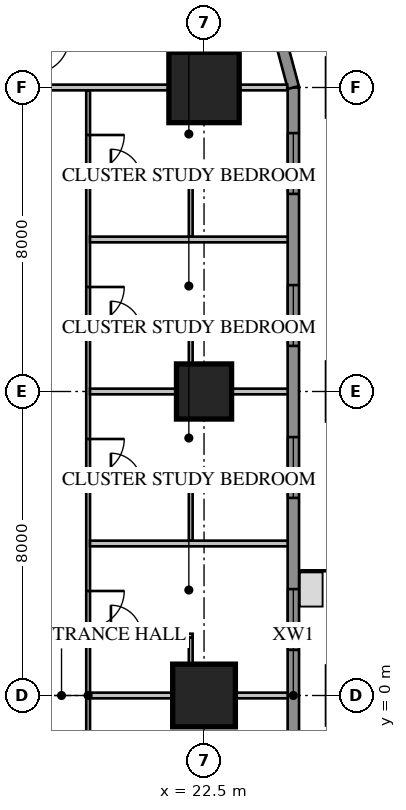
"""IFC4 building model, lengths in metres.
Left out: names, types, materials, properties, quantities, classifications, styles, units other than length and angle.
Written with IfcOpenShell. Run it as: python <this file> out.ifc"""

import sys

from ifc_helpers import new_model, si_unit, direction, frame, frame_2d, origin, origin_2d, place, context, subcontext, project, spatial, rectangle, extrude, element, fill, save


model = new_model("IFC4")
c1 = context("Model", 3, precision=1e-05, world=origin(), true_north=direction((0.0, 1.0)))
c2 = subcontext(c1, "Body", "Model", "MODEL_VIEW")
j1 = project(units=[si_unit("LENGTHUNIT", "METRE"), si_unit("PLANEANGLEUNIT", "RADIAN")], contexts=[c1])
p1 = place(None, origin())
s1 = spatial("IfcSite", under=j1, at=p1, CompositionType="ELEMENT")
p2 = place(p1, origin())
s2 = spatial("IfcBuilding", under=s1, at=p2, CompositionType="ELEMENT")
p3 = place(p2, frame((0.0, 0.0, 27.55)))
s3 = spatial("IfcBuildingStorey", under=s2, at=p3, CompositionType="ELEMENT", Elevation=27.55)
p4 = place(p3, frame((22.5, 0.0, 0.0), z_axis=(0.0, 0.0, 1.0), x_axis=(1.0, 0.0, 0.0)))
e1 = element("IfcColumn", 1, at=p4, inside=s3, PredefinedType="COLUMN", context=c2, shape_type="SweptSolid", body=[
    extrude(rectangle(XDim=1.65, YDim=1.65, at=origin_2d()), origin(), (0.0, 0.0, 1.0), 3.85),
])
p5 = place(p3, frame((22.5, 8.0, 0.0), z_axis=(0.0, 0.0, 1.0), x_axis=(1.0, 0.0, 0.0)))
e2 = element("IfcColumn", 2, at=p5, inside=s3, PredefinedType="COLUMN", context=c2, shape_type="SweptSolid", body=[
    extrude(rectangle(XDim=1.45, YDim=1.45, at=origin_2d()), origin(), (0.0, 0.0, 1.0), 3.85),
])
p6 = place(p3, frame((22.5, 16.0, 0.0), z_axis=(0.0, 0.0, 1.0), x_axis=(1.0, 0.0, 0.0)))
e3 = element("IfcColumn", 3, at=p6, inside=s3, PredefinedType="COLUMN", context=c2, shape_type="SweptSolid", body=[
    extrude(rectangle(XDim=1.85, YDim=1.85, at=origin_2d()), origin(), (0.0, 0.0, 1.0), 3.85),
])
p7 = place(p3, frame((24.85, -16.0, 0.0), z_axis=(0.0, 0.0, 1.0), x_axis=(0.0, 1.0, 0.0)))
e4 = element("IfcWall", 4, at=p7, inside=s3, PredefinedType="SOLIDWALL", context=c2, shape_type="SweptSolid", body=[
    extrude(rectangle(XDim=32.0, YDim=0.3, at=frame_2d((16.0, 0.0))), origin(), (0.0, 0.0, 1.0), 3.65),
])
p8 = place(p7, frame((1.2, 0.0, 0.75)))
e5 = element("IfcOpeningElement", 5, at=p8, cuts=e4, PredefinedType="OPENING", context=c2, shape_type="SweptSolid", body=[
    extrude(rectangle(XDim=1.6, YDim=1.8, at=frame_2d((0.8, 0.9))), frame((0.0, 0.17, 0.0), z_axis=(0.0, -1.0, 0.0), x_axis=(1.0, 0.0, 0.0)), (0.0, 0.0, 1.0), 0.34),
])
p9 = place(p7, frame((5.2, 0.0, 0.75)))
e6 = element("IfcOpeningElement", 6, at=p9, cuts=e4, PredefinedType="OPENING", context=c2, shape_type="SweptSolid", body=[
    extrude(rectangle(XDim=1.6, YDim=1.8, at=frame_2d((0.8, 0.9))), frame((0.0, 0.17, 0.0), z_axis=(0.0, -1.0, 0.0), x_axis=(1.0, 0.0, 0.0)), (0.0, 0.0, 1.0), 0.34),
])
p10 = place(p7, frame((17.2, 0.0, 0.75)))
e7 = element("IfcOpeningElement", 7, at=p10, cuts=e4, PredefinedType="OPENING", context=c2, shape_type="SweptSolid", body=[
    extrude(rectangle(XDim=1.6, YDim=1.8, at=frame_2d((0.8, 0.9))), frame((0.0, 0.17, 0.0), z_axis=(0.0, -1.0, 0.0), x_axis=(1.0, 0.0, 0.0)), (0.0, 0.0, 1.0), 0.34),
])
p11 = place(p7, frame((21.2, 0.0, 0.75)))
e8 = element("IfcOpeningElement", 8, at=p11, cuts=e4, PredefinedType="OPENING", context=c2, shape_type="SweptSolid", body=[
    extrude(rectangle(XDim=1.6, YDim=1.8, at=frame_2d((0.8, 0.9))), frame((0.0, 0.17, 0.0), z_axis=(0.0, -1.0, 0.0), x_axis=(1.0, 0.0, 0.0)), (0.0, 0.0, 1.0), 0.34),
])
p12 = place(p7, frame((25.2, 0.0, 0.75)))
e9 = element("IfcOpeningElement", 9, at=p12, cuts=e4, PredefinedType="OPENING", context=c2, shape_type="SweptSolid", body=[
    extrude(rectangle(XDim=1.6, YDim=1.8, at=frame_2d((0.8, 0.9))), frame((0.0, 0.17, 0.0), z_axis=(0.0, -1.0, 0.0), x_axis=(1.0, 0.0, 0.0)), (0.0, 0.0, 1.0), 0.34),
])
p13 = place(p7, frame((29.2, 0.0, 0.75)))
e10 = element("IfcOpeningElement", 10, at=p13, cuts=e4, PredefinedType="OPENING", context=c2, shape_type="SweptSolid", body=[
    extrude(rectangle(XDim=1.6, YDim=1.8, at=frame_2d((0.8, 0.9))), frame((0.0, 0.17, 0.0), z_axis=(0.0, -1.0, 0.0), x_axis=(1.0, 0.0, 0.0)), (0.0, 0.0, 1.0), 0.34),
])
p14 = place(p7, frame((8.8, 0.0, 0.75)))
e11 = element("IfcOpeningElement", 11, at=p14, cuts=e4, PredefinedType="OPENING", context=c2, shape_type="SweptSolid", body=[
    extrude(rectangle(XDim=2.4, YDim=1.8, at=frame_2d((1.2, 0.9))), frame((0.0, 0.17, 0.0), z_axis=(0.0, -1.0, 0.0), x_axis=(1.0, 0.0, 0.0)), (0.0, 0.0, 1.0), 0.34),
])
p15 = place(p7, frame((13.812, 0.0, 0.0)))
e12 = element("IfcOpeningElement", 12, at=p15, cuts=e4, PredefinedType="OPENING", context=c2, shape_type="SweptSolid", body=[
    extrude(rectangle(XDim=1.0, YDim=2.4, at=frame_2d((0.5, 1.2))), frame((0.0, 0.17, 0.0), z_axis=(0.0, -1.0, 0.0), x_axis=(1.0, 0.0, 0.0)), (0.0, 0.0, 1.0), 0.34),
])
p16 = place(p3, frame((24.85, 16.0, 0.0), z_axis=(0.0, 0.0, 1.0), x_axis=(-0.258839972501, 0.965920218567, 0.0)))
e13 = element("IfcWall", 13, at=p16, inside=s3, PredefinedType="SOLIDWALL", context=c2, shape_type="SweptSolid", body=[
    extrude(rectangle(XDim=4.581, YDim=0.3, at=frame_2d((2.291, 0.0))), origin(), (0.0, 0.0, 1.0), 3.65),
])
p17 = place(p3, frame((19.45, -15.925, 0.0), z_axis=(0.0, 0.0, 1.0), x_axis=(0.0, 1.0, 0.0)))
e14 = element("IfcWall", 14, at=p17, inside=s3, PredefinedType="PARTITIONING", context=c2, shape_type="SweptSolid", body=[
    extrude(rectangle(XDim=31.85, YDim=0.1, at=frame_2d((15.925, 0.0))), origin(), (0.0, 0.0, 1.0), 3.65),
])
p18 = place(p17, frame((10.125, 0.0, 0.0)))
e15 = element("IfcOpeningElement", 15, at=p18, cuts=e14, PredefinedType="OPENING", context=c2, shape_type="SweptSolid", body=[
    extrude(rectangle(XDim=1.0, YDim=2.1, at=frame_2d((0.5, 1.05))), frame((0.0, 0.07, 0.0), z_axis=(0.0, -1.0, 0.0), x_axis=(1.0, 0.0, 0.0)), (0.0, 0.0, 1.0), 0.14),
])
p19 = place(p17, frame((8.3, 0.0, 0.0)))
e16 = element("IfcOpeningElement", 16, at=p19, cuts=e14, PredefinedType="OPENING", context=c2, shape_type="SweptSolid", body=[
    extrude(rectangle(XDim=0.8, YDim=2.1, at=frame_2d((0.4, 1.05))), frame((0.0, 0.07, 0.0), z_axis=(0.0, -1.0, 0.0), x_axis=(1.0, 0.0, 0.0)), (0.0, 0.0, 1.0), 0.14),
])
p20 = place(p17, frame((1.725, 0.0, 0.0)))
e17 = element("IfcOpeningElement", 17, at=p20, cuts=e14, PredefinedType="OPENING", context=c2, shape_type="SweptSolid", body=[
    extrude(rectangle(XDim=0.95, YDim=2.1, at=frame_2d((0.475, 1.05))), frame((0.0, 0.07, 0.0), z_axis=(0.0, -1.0, 0.0), x_axis=(1.0, 0.0, 0.0)), (0.0, 0.0, 1.0), 0.14),
])
p21 = place(p17, frame((5.725, 0.0, 0.0)))
e18 = element("IfcOpeningElement", 18, at=p21, cuts=e14, PredefinedType="OPENING", context=c2, shape_type="SweptSolid", body=[
    extrude(rectangle(XDim=0.95, YDim=2.1, at=frame_2d((0.475, 1.05))), frame((0.0, 0.07, 0.0), z_axis=(0.0, -1.0, 0.0), x_axis=(1.0, 0.0, 0.0)), (0.0, 0.0, 1.0), 0.14),
])
p22 = place(p17, frame((17.725, 0.0, 0.0)))
e19 = element("IfcOpeningElement", 19, at=p22, cuts=e14, PredefinedType="OPENING", context=c2, shape_type="SweptSolid", body=[
    extrude(rectangle(XDim=0.95, YDim=2.1, at=frame_2d((0.475, 1.05))), frame((0.0, 0.07, 0.0), z_axis=(0.0, -1.0, 0.0), x_axis=(1.0, 0.0, 0.0)), (0.0, 0.0, 1.0), 0.14),
])
p23 = place(p17, frame((21.725, 0.0, 0.0)))
e20 = element("IfcOpeningElement", 20, at=p23, cuts=e14, PredefinedType="OPENING", context=c2, shape_type="SweptSolid", body=[
    extrude(rectangle(XDim=0.95, YDim=2.1, at=frame_2d((0.475, 1.05))), frame((0.0, 0.07, 0.0), z_axis=(0.0, -1.0, 0.0), x_axis=(1.0, 0.0, 0.0)), (0.0, 0.0, 1.0), 0.14),
])
p24 = place(p17, frame((25.725, 0.0, 0.0)))
e21 = element("IfcOpeningElement", 21, at=p24, cuts=e14, PredefinedType="OPENING", context=c2, shape_type="SweptSolid", body=[
    extrude(rectangle(XDim=0.95, YDim=2.1, at=frame_2d((0.475, 1.05))), frame((0.0, 0.07, 0.0), z_axis=(0.0, -1.0, 0.0), x_axis=(1.0, 0.0, 0.0)), (0.0, 0.0, 1.0), 0.14),
])
p25 = place(p17, frame((29.725, 0.0, 0.0)))
e22 = element("IfcOpeningElement", 22, at=p25, cuts=e14, PredefinedType="OPENING", context=c2, shape_type="SweptSolid", body=[
    extrude(rectangle(XDim=0.95, YDim=2.1, at=frame_2d((0.475, 1.05))), frame((0.0, 0.07, 0.0), z_axis=(0.0, -1.0, 0.0), x_axis=(1.0, 0.0, 0.0)), (0.0, 0.0, 1.0), 0.14),
])
p26 = place(p3, frame((19.5, 0.0, 0.0), z_axis=(0.0, 0.0, 1.0), x_axis=(1.0, 0.0, 0.0)))
e23 = element("IfcWall", 23, at=p26, inside=s3, PredefinedType="PARTITIONING", context=c2, shape_type="SweptSolid", body=[
    extrude(rectangle(XDim=5.2, YDim=0.15, at=frame_2d((2.6, 0.0))), origin(), (0.0, 0.0, 1.0), 2.957),
])
for number, where, z_axis, x_axis in (
    (24, (19.5, 4.0, 0.0), (0.0, 0.0, 1.0), (1.0, 0.0, 0.0)),
    (25, (19.5, 8.0, 0.0), (0.0, 0.0, 1.0), (1.0, 0.0, 0.0)),
    (26, (19.5, 12.0, 0.0), (0.0, 0.0, 1.0), (1.0, 0.0, 0.0)),
):
    element("IfcWall", number, at=place(p3, frame(where, z_axis=z_axis, x_axis=x_axis)), inside=s3, PredefinedType="PARTITIONING", context=c2, shape_type="SweptSolid", body=[
        extrude(rectangle(XDim=5.2, YDim=0.15, at=frame_2d((2.6, 0.0))), origin(), (0.0, 0.0, 1.0), 3.65),
    ])
p27 = place(p3, frame((18.1, 16.0, 0.0), z_axis=(0.0, 0.0, 1.0), x_axis=(1.0, 0.0, 0.0)))
e27 = element("IfcWall", 27, at=p27, inside=s3, PredefinedType="PARTITIONING", context=c2, shape_type="SweptSolid", body=[
    extrude(rectangle(XDim=6.589, YDim=0.15, at=frame_2d((3.295, 0.0))), origin(), (0.0, 0.0, 1.0), 3.65),
])
p28 = place(p3, frame((19.5, 1.575, 0.0), z_axis=(0.0, 0.0, 1.0), x_axis=(1.0, 0.0, 0.0)))
e28 = element("IfcWall", 28, at=p28, inside=s3, PredefinedType="PARTITIONING", context=c2, shape_type="SweptSolid", body=[
    extrude(rectangle(XDim=2.7, YDim=0.1, at=frame_2d((1.35, 0.0))), origin(), (0.0, 0.0, 1.0), 3.65),
])
p29 = place(p28, frame((0.55, 0.0, 0.0)))
e29 = element("IfcOpeningElement", 29, at=p29, cuts=e28, PredefinedType="OPENING", context=c2, shape_type="SweptSolid", body=[
    extrude(rectangle(XDim=0.8, YDim=2.1, at=frame_2d((0.4, 1.05))), frame((0.0, 0.07, 0.0), z_axis=(0.0, -1.0, 0.0), x_axis=(1.0, 0.0, 0.0)), (0.0, 0.0, 1.0), 0.14),
])
p30 = place(p3, frame((22.15, 0.075, 0.0), z_axis=(0.0, 0.0, 1.0), x_axis=(0.0, 1.0, 0.0)))
e30 = element("IfcWall", 30, at=p30, inside=s3, PredefinedType="PARTITIONING", context=c2, shape_type="SweptSolid", body=[
    extrude(rectangle(XDim=1.45, YDim=0.1, at=frame_2d((0.725, 0.0))), origin(), (0.0, 0.0, 1.0), 3.65),
])
p31 = place(p3, frame((19.5, 5.575, 0.0), z_axis=(0.0, 0.0, 1.0), x_axis=(1.0, 0.0, 0.0)))
e31 = element("IfcWall", 31, at=p31, inside=s3, PredefinedType="PARTITIONING", context=c2, shape_type="SweptSolid", body=[
    extrude(rectangle(XDim=2.7, YDim=0.1, at=frame_2d((1.35, 0.0))), origin(), (0.0, 0.0, 1.0), 3.65),
])
p32 = place(p31, frame((0.55, 0.0, 0.0)))
e32 = element("IfcOpeningElement", 32, at=p32, cuts=e31, PredefinedType="OPENING", context=c2, shape_type="SweptSolid", body=[
    extrude(rectangle(XDim=0.8, YDim=2.1, at=frame_2d((0.4, 1.05))), frame((0.0, 0.07, 0.0), z_axis=(0.0, -1.0, 0.0), x_axis=(1.0, 0.0, 0.0)), (0.0, 0.0, 1.0), 0.14),
])
p33 = place(p3, frame((22.15, 4.075, 0.0), z_axis=(0.0, 0.0, 1.0), x_axis=(0.0, 1.0, 0.0)))
e33 = element("IfcWall", 33, at=p33, inside=s3, PredefinedType="PARTITIONING", context=c2, shape_type="SweptSolid", body=[
    extrude(rectangle(XDim=1.45, YDim=0.1, at=frame_2d((0.725, 0.0))), origin(), (0.0, 0.0, 1.0), 3.65),
])
p34 = place(p3, frame((19.5, 9.575, 0.0), z_axis=(0.0, 0.0, 1.0), x_axis=(1.0, 0.0, 0.0)))
e34 = element("IfcWall", 34, at=p34, inside=s3, PredefinedType="PARTITIONING", context=c2, shape_type="SweptSolid", body=[
    extrude(rectangle(XDim=2.7, YDim=0.1, at=frame_2d((1.35, 0.0))), origin(), (0.0, 0.0, 1.0), 3.65),
])
p35 = place(p34, frame((0.55, 0.0, 0.0)))
e35 = element("IfcOpeningElement", 35, at=p35, cuts=e34, PredefinedType="OPENING", context=c2, shape_type="SweptSolid", body=[
    extrude(rectangle(XDim=0.8, YDim=2.1, at=frame_2d((0.4, 1.05))), frame((0.0, 0.07, 0.0), z_axis=(0.0, -1.0, 0.0), x_axis=(1.0, 0.0, 0.0)), (0.0, 0.0, 1.0), 0.14),
])
p36 = place(p3, frame((22.15, 8.075, 0.0), z_axis=(0.0, 0.0, 1.0), x_axis=(0.0, 1.0, 0.0)))
e36 = element("IfcWall", 36, at=p36, inside=s3, PredefinedType="PARTITIONING", context=c2, shape_type="SweptSolid", body=[
    extrude(rectangle(XDim=1.45, YDim=0.1, at=frame_2d((0.725, 0.0))), origin(), (0.0, 0.0, 1.0), 3.65),
])
p37 = place(p3, frame((19.5, 13.575, 0.0), z_axis=(0.0, 0.0, 1.0), x_axis=(1.0, 0.0, 0.0)))
e37 = element("IfcWall", 37, at=p37, inside=s3, PredefinedType="PARTITIONING", context=c2, shape_type="SweptSolid", body=[
    extrude(rectangle(XDim=2.7, YDim=0.1, at=frame_2d((1.35, 0.0))), origin(), (0.0, 0.0, 1.0), 3.65),
])
p38 = place(p37, frame((0.55, 0.0, 0.0)))
e38 = element("IfcOpeningElement", 38, at=p38, cuts=e37, PredefinedType="OPENING", context=c2, shape_type="SweptSolid", body=[
    extrude(rectangle(XDim=0.8, YDim=2.1, at=frame_2d((0.4, 1.05))), frame((0.0, 0.07, 0.0), z_axis=(0.0, -1.0, 0.0), x_axis=(1.0, 0.0, 0.0)), (0.0, 0.0, 1.0), 0.14),
])
p39 = place(p3, frame((22.15, 12.075, 0.0), z_axis=(0.0, 0.0, 1.0), x_axis=(0.0, 1.0, 0.0)))
e39 = element("IfcWall", 39, at=p39, inside=s3, PredefinedType="PARTITIONING", context=c2, shape_type="SweptSolid", body=[
    extrude(rectangle(XDim=1.45, YDim=0.1, at=frame_2d((0.725, 0.0))), origin(), (0.0, 0.0, 1.0), 3.65),
])
p40 = place(p10, origin())
e40 = element("IfcWindow", 40, at=p40, inside=s3, PartitioningType="SINGLE_PANEL", PredefinedType="WINDOW", context=c2, shape_type="SweptSolid", body=[
    extrude(rectangle(XDim=1.6, YDim=1.8, at=frame_2d((0.8, 0.9))), frame((0.0, 0.03, 0.0), z_axis=(0.0, -1.0, 0.0), x_axis=(1.0, 0.0, 0.0)), (0.0, 0.0, 1.0), 0.06),
])
fill(e7, e40)
p41 = place(p11, origin())
e41 = element("IfcWindow", 41, at=p41, inside=s3, PartitioningType="SINGLE_PANEL", PredefinedType="WINDOW", context=c2, shape_type="SweptSolid", body=[
    extrude(rectangle(XDim=1.6, YDim=1.8, at=frame_2d((0.8, 0.9))), frame((0.0, 0.03, 0.0), z_axis=(0.0, -1.0, 0.0), x_axis=(1.0, 0.0, 0.0)), (0.0, 0.0, 1.0), 0.06),
])
fill(e8, e41)
p42 = place(p12, origin())
e42 = element("IfcWindow", 42, at=p42, inside=s3, PartitioningType="SINGLE_PANEL", PredefinedType="WINDOW", context=c2, shape_type="SweptSolid", body=[
    extrude(rectangle(XDim=1.6, YDim=1.8, at=frame_2d((0.8, 0.9))), frame((0.0, 0.03, 0.0), z_axis=(0.0, -1.0, 0.0), x_axis=(1.0, 0.0, 0.0)), (0.0, 0.0, 1.0), 0.06),
])
fill(e9, e42)
p43 = place(p13, origin())
e43 = element("IfcWindow", 43, at=p43, inside=s3, PartitioningType="SINGLE_PANEL", PredefinedType="WINDOW", context=c2, shape_type="SweptSolid", body=[
    extrude(rectangle(XDim=1.6, YDim=1.8, at=frame_2d((0.8, 0.9))), frame((0.0, 0.03, 0.0), z_axis=(0.0, -1.0, 0.0), x_axis=(1.0, 0.0, 0.0)), (0.0, 0.0, 1.0), 0.06),
])
fill(e10, e43)
p44 = place(p22, origin())
e44 = element("IfcDoor", 44, at=p44, inside=s3, OperationType="SINGLE_SWING_RIGHT", PredefinedType="DOOR", context=c2, shape_type="SweptSolid", body=[
    extrude(rectangle(XDim=0.95, YDim=2.1, at=frame_2d((0.475, 1.05))), frame((0.0, 0.025, 0.0), z_axis=(0.0, -1.0, 0.0), x_axis=(1.0, 0.0, 0.0)), (0.0, 0.0, 1.0), 0.05),
])
fill(e19, e44)
p45 = place(p29, origin())
e45 = element("IfcDoor", 45, at=p45, inside=s3, OperationType="SINGLE_SWING_LEFT", PredefinedType="DOOR", context=c2, shape_type="SweptSolid", body=[
    extrude(rectangle(XDim=0.8, YDim=2.1, at=frame_2d((0.4, 1.05))), frame((0.0, 0.025, 0.0), z_axis=(0.0, -1.0, 0.0), x_axis=(1.0, 0.0, 0.0)), (0.0, 0.0, 1.0), 0.05),
])
fill(e29, e45)
p46 = place(p23, origin())
e46 = element("IfcDoor", 46, at=p46, inside=s3, OperationType="SINGLE_SWING_RIGHT", PredefinedType="DOOR", context=c2, shape_type="SweptSolid", body=[
    extrude(rectangle(XDim=0.95, YDim=2.1, at=frame_2d((0.475, 1.05))), frame((0.0, 0.025, 0.0), z_axis=(0.0, -1.0, 0.0), x_axis=(1.0, 0.0, 0.0)), (0.0, 0.0, 1.0), 0.05),
])
fill(e20, e46)
p47 = place(p32, origin())
e47 = element("IfcDoor", 47, at=p47, inside=s3, OperationType="SINGLE_SWING_LEFT", PredefinedType="DOOR", context=c2, shape_type="SweptSolid", body=[
    extrude(rectangle(XDim=0.8, YDim=2.1, at=frame_2d((0.4, 1.05))), frame((0.0, 0.025, 0.0), z_axis=(0.0, -1.0, 0.0), x_axis=(1.0, 0.0, 0.0)), (0.0, 0.0, 1.0), 0.05),
])
fill(e32, e47)
p48 = place(p24, origin())
e48 = element("IfcDoor", 48, at=p48, inside=s3, OperationType="SINGLE_SWING_RIGHT", PredefinedType="DOOR", context=c2, shape_type="SweptSolid", body=[
    extrude(rectangle(XDim=0.95, YDim=2.1, at=frame_2d((0.475, 1.05))), frame((0.0, 0.025, 0.0), z_axis=(0.0, -1.0, 0.0), x_axis=(1.0, 0.0, 0.0)), (0.0, 0.0, 1.0), 0.05),
])
fill(e21, e48)
p49 = place(p35, origin())
e49 = element("IfcDoor", 49, at=p49, inside=s3, OperationType="SINGLE_SWING_LEFT", PredefinedType="DOOR", context=c2, shape_type="SweptSolid", body=[
    extrude(rectangle(XDim=0.8, YDim=2.1, at=frame_2d((0.4, 1.05))), frame((0.0, 0.025, 0.0), z_axis=(0.0, -1.0, 0.0), x_axis=(1.0, 0.0, 0.0)), (0.0, 0.0, 1.0), 0.05),
])
fill(e35, e49)
p50 = place(p25, origin())
e50 = element("IfcDoor", 50, at=p50, inside=s3, OperationType="SINGLE_SWING_RIGHT", PredefinedType="DOOR", context=c2, shape_type="SweptSolid", body=[
    extrude(rectangle(XDim=0.95, YDim=2.1, at=frame_2d((0.475, 1.05))), frame((0.0, 0.025, 0.0), z_axis=(0.0, -1.0, 0.0), x_axis=(1.0, 0.0, 0.0)), (0.0, 0.0, 1.0), 0.05),
])
fill(e22, e50)
p51 = place(p38, origin())
e51 = element("IfcDoor", 51, at=p51, inside=s3, OperationType="SINGLE_SWING_LEFT", PredefinedType="DOOR", context=c2, shape_type="SweptSolid", body=[
    extrude(rectangle(XDim=0.8, YDim=2.1, at=frame_2d((0.4, 1.05))), frame((0.0, 0.025, 0.0), z_axis=(0.0, -1.0, 0.0), x_axis=(1.0, 0.0, 0.0)), (0.0, 0.0, 1.0), 0.05),
])
fill(e38, e51)
save(model, sys.argv[1])
